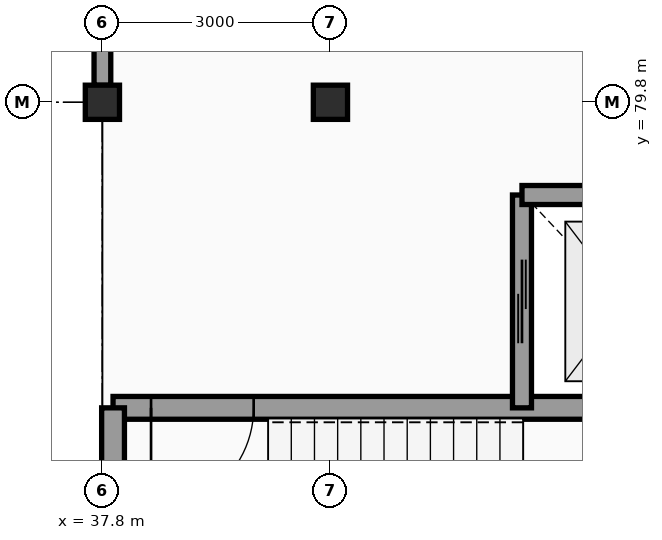
"""IFC4 building model, lengths in metres.
Left out: names, types, materials, properties, quantities, classifications, styles, units other than length and angle.
Written with IfcOpenShell. Run it as: python <this file> out.ifc"""

import sys

from ifc_helpers import new_model, si_unit, direction, frame, frame_2d, origin, origin_2d, place, context, subcontext, project, spatial, rectangle, extrude, element, fill, save


model = new_model("IFC4")
c1 = context("Model", 3, precision=1e-05, world=origin(), true_north=direction((0.0, 1.0)))
c2 = subcontext(c1, "Body", "Model", "MODEL_VIEW")
j1 = project(units=[si_unit("LENGTHUNIT", "METRE"), si_unit("PLANEANGLEUNIT", "RADIAN")], contexts=[c1])
p1 = place(None, origin())
s1 = spatial("IfcSite", under=j1, at=p1, CompositionType="ELEMENT")
p2 = place(p1, origin())
s2 = spatial("IfcBuilding", under=s1, at=p2, CompositionType="ELEMENT")
p3 = place(p2, frame((0.0, 0.0, 15.0)))
s3 = spatial("IfcBuildingStorey", under=s2, at=p3, CompositionType="ELEMENT", Elevation=15.0)
for number, where, z_axis, x_axis in (
    (1, (37.8, 79.8, 0.0), (0.0, 0.0, 1.0), (1.0, 0.0, 0.0)),
    (2, (40.8, 79.8, 0.0), (0.0, 0.0, 1.0), (1.0, 0.0, 0.0)),
):
    element("IfcColumn", number, at=place(p3, frame(where, z_axis=z_axis, x_axis=x_axis)), inside=s3, PredefinedType="COLUMN", context=c2, shape_type="SweptSolid", body=[
        extrude(rectangle(XDim=0.45, YDim=0.45, at=origin_2d()), origin(), (0.0, 0.0, 1.0), 3.6),
    ])
p4 = place(p3, frame((37.8, 80.023, 0.0), z_axis=(0.0, 0.0, 1.0), x_axis=(0.0, 1.0, 0.0)))
e3 = element("IfcWall", 3, at=p4, inside=s3, PredefinedType="SOLIDWALL", context=c2, shape_type="SweptSolid", body=[
    extrude(rectangle(XDim=4.097, YDim=0.22, at=frame_2d((2.049, 0.0))), origin(), (0.0, 0.0, 1.0), 3.35),
])
p5 = place(p4, frame((1.448, 0.0, 0.95)))
e4 = element("IfcOpeningElement", 4, at=p5, cuts=e3, PredefinedType="OPENING", context=c2, shape_type="SweptSolid", body=[
    extrude(rectangle(XDim=1.2, YDim=1.5, at=frame_2d((0.6, 0.75))), frame((0.0, 0.12, 0.0), z_axis=(0.0, -1.0, 0.0), x_axis=(1.0, 0.0, 0.0)), (0.0, 0.0, 1.0), 0.24),
])
p6 = place(p3, frame((46.06, 75.78, 0.0), z_axis=(0.0, 0.0, 1.0), x_axis=(-1.0, 0.0, 0.0)))
e5 = element("IfcWall", 5, at=p6, inside=s3, PredefinedType="SHEAR", context=c2, shape_type="SweptSolid", body=[
    extrude(rectangle(XDim=8.12, YDim=0.3, at=frame_2d((4.06, 0.0))), origin(), (0.0, 0.0, 1.0), 3.6),
])
p7 = place(p6, frame((6.27, 0.0, 0.0)))
e6 = element("IfcOpeningElement", 6, at=p7, cuts=e5, PredefinedType="OPENING", context=c2, shape_type="SweptSolid", body=[
    extrude(rectangle(XDim=1.35, YDim=2.15, at=frame_2d((0.675, 1.075))), frame((0.0, 0.16, 0.0), z_axis=(0.0, -1.0, 0.0), x_axis=(1.0, 0.0, 0.0)), (0.0, 0.0, 1.0), 0.32),
])
p8 = place(p3, frame((37.94, 75.78, 0.0), z_axis=(0.0, 0.0, 1.0), x_axis=(0.0, -1.0, 0.0)))
e7 = element("IfcWall", 7, at=p8, inside=s3, PredefinedType="SHEAR", context=c2, shape_type="SweptSolid", body=[
    extrude(rectangle(XDim=4.24, YDim=0.3, at=frame_2d((2.12, 0.0))), origin(), (0.0, 0.0, 1.0), 3.6),
])
p9 = place(p3, frame((43.32, 78.58, 0.0), z_axis=(0.0, 0.0, 1.0), x_axis=(0.0, -1.0, 0.0)))
e8 = element("IfcWall", 8, at=p9, inside=s3, PredefinedType="SHEAR", context=c2, shape_type="SweptSolid", body=[
    extrude(rectangle(XDim=2.8, YDim=0.25, at=frame_2d((1.4, 0.0))), origin(), (0.0, 0.0, 1.0), 3.6),
])
p10 = place(p9, frame((0.85, 0.0, 0.0)))
e9 = element("IfcOpeningElement", 9, at=p10, cuts=e8, PredefinedType="OPENING", context=c2, shape_type="SweptSolid", body=[
    extrude(rectangle(XDim=1.1, YDim=2.15, at=frame_2d((0.55, 1.075))), frame((0.0, 0.135, 0.0), z_axis=(0.0, -1.0, 0.0), x_axis=(1.0, 0.0, 0.0)), (0.0, 0.0, 1.0), 0.27),
])
p11 = place(p3, frame((46.06, 78.58, 0.0), z_axis=(0.0, 0.0, 1.0), x_axis=(-1.0, 0.0, 0.0)))
e10 = element("IfcWall", 10, at=p11, inside=s3, PredefinedType="SHEAR", context=c2, shape_type="SweptSolid", body=[
    extrude(rectangle(XDim=2.74, YDim=0.25, at=frame_2d((1.37, 0.0))), origin(), (0.0, 0.0, 1.0), 3.6),
])
p12 = place(p7, frame((1.35, 0.0, 0.0), z_axis=(0.0, 0.0, 1.0), x_axis=(-1.0, 0.0, 0.0)))
e11 = element("IfcDoor", 11, at=p12, inside=s3, OperationType="SINGLE_SWING_RIGHT", PredefinedType="DOOR", context=c2, shape_type="SweptSolid", body=[
    extrude(rectangle(XDim=1.35, YDim=2.15, at=frame_2d((0.675, 1.075))), frame((0.0, 0.025, 0.0), z_axis=(0.0, -1.0, 0.0), x_axis=(1.0, 0.0, 0.0)), (0.0, 0.0, 1.0), 0.05),
])
fill(e6, e11)
p13 = place(p10, origin())
e12 = element("IfcDoor", 12, at=p13, inside=s3, OperationType="DOUBLE_DOOR_SLIDING", PredefinedType="DOOR", context=c2, shape_type="SweptSolid", body=[
    extrude(rectangle(XDim=1.1, YDim=2.15, at=frame_2d((0.55, 1.075))), frame((0.0, 0.025, 0.0), z_axis=(0.0, -1.0, 0.0), x_axis=(1.0, 0.0, 0.0)), (0.0, 0.0, 1.0), 0.05),
])
fill(e9, e12)
save(model, sys.argv[1])
